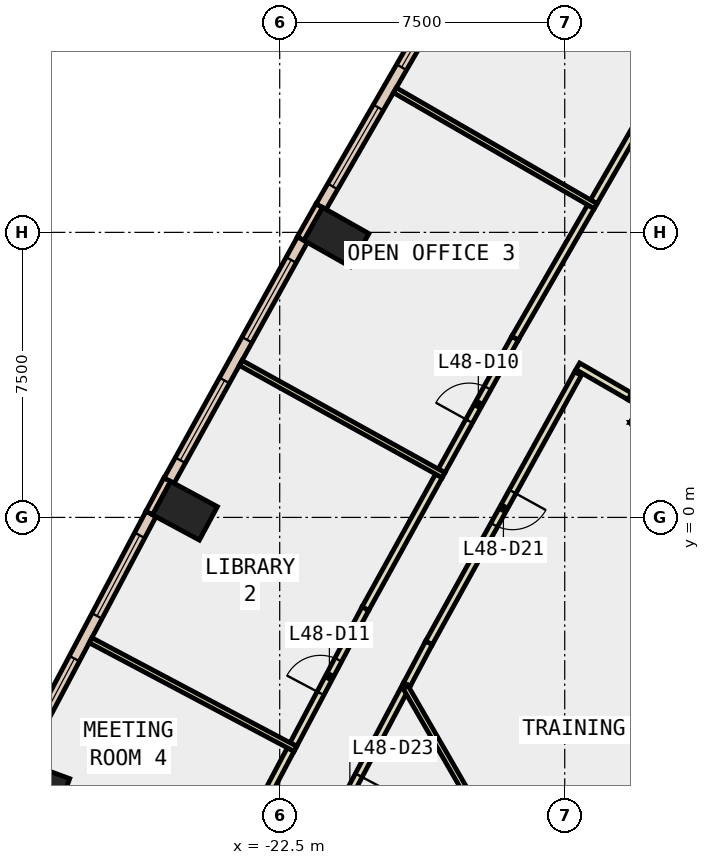
"""IFC4 building model, lengths in metres.
Left out: names, types, materials, properties, quantities, classifications, styles, units other than length and angle.
Written with IfcOpenShell. Run it as: python <this file> out.ifc"""

import sys

from ifc_helpers import new_model, si_unit, direction, frame, frame_2d, origin, origin_2d, place, context, subcontext, project, spatial, polyline, rectangle, outline, extrude, element, fill, save


model = new_model("IFC4")
c1 = context("Model", 3, precision=1e-05, world=origin(), true_north=direction((0.0, 1.0)))
c2 = subcontext(c1, "Body", "Model", "MODEL_VIEW")
j1 = project(units=[si_unit("LENGTHUNIT", "METRE"), si_unit("PLANEANGLEUNIT", "RADIAN")], contexts=[c1])
p1 = place(None, origin())
s1 = spatial("IfcSite", under=j1, at=p1, CompositionType="ELEMENT")
p2 = place(p1, origin())
s2 = spatial("IfcBuilding", under=s1, at=p2, CompositionType="ELEMENT")
p3 = place(p2, frame((0.0, 0.0, 215.0)))
s3 = spatial("IfcBuildingStorey", under=s2, at=p3, CompositionType="ELEMENT", Elevation=215.0)
for number, where, z_axis, x_axis in (
    (1, (-21.007, 7.377, -0.4), (0.0, 0.0, 1.0), (0.491, 0.871, 0.0)),
    (2, (-24.993, 0.175, -0.4), (0.0, 0.0, 1.0), (0.474, 0.88, 0.0)),
    (3, (-28.856, -7.1, -0.4), (0.0, 0.0, 1.0), (0.347, 0.938, 0.0)),
):
    element("IfcColumn", number, at=place(p3, frame(where, z_axis=z_axis, x_axis=x_axis)), inside=s3, PredefinedType="COLUMN", context=c2, shape_type="SweptSolid", body=[
        extrude(rectangle(XDim=1.0, YDim=1.4, at=origin_2d()), origin(), (0.0, 0.0, 1.0), 4.2),
    ])
p4 = place(p3, frame((0.0, 0.0, -0.4)))
e4 = element("IfcWall", 4, at=p4, inside=s3, PredefinedType="SHEAR", context=c2, shape_type="SweptSolid", body=[
    extrude(outline(polyline([(-12.228, 2.92), (-12.834, 3.27), (-13.279, 2.5), (-12.471, 2.5), (-12.228, 2.92)])), origin(), (0.0, 0.0, 1.0), 4.2),
])
p5 = place(p3, frame((0.0, 0.0, -0.4)))
e5 = element("IfcWall", 5, at=p5, inside=s3, PredefinedType="SHEAR", context=c2, shape_type="SweptSolid", body=[
    extrude(outline(polyline([(-13.279, 2.5), (-6.64, -9.0), (-6.235, -8.3), (-12.471, 2.5), (-13.279, 2.5)])), origin(), (0.0, 0.0, 1.0), 4.2),
])
p6 = place(p3, frame((-8.877, -5.125, -0.4), z_axis=(0.0, 0.0, 1.0), x_axis=(-0.866017533419, -0.500013631625, 0.0)))
e6 = element("IfcWall", 6, at=p6, inside=s3, PredefinedType="SHEAR", context=c2, shape_type="SweptSolid", body=[
    extrude(rectangle(XDim=9.0, YDim=0.8, at=frame_2d((4.5, 0.0))), origin(), (0.0, 0.0, 1.0), 4.2),
])
for number, where, z_axis, x_axis in (
    (7, (-21.458, 8.205, 0.0), (0.0, 0.0, 1.0), (-0.492, -0.871, 0.0)),
    (8, (-25.46, 0.995, 0.0), (0.0, 0.0, 1.0), (-0.474, -0.881, 0.0)),
):
    element("IfcWall", number, at=place(p3, frame(where, z_axis=z_axis, x_axis=x_axis)), inside=s3, PredefinedType="STANDARD", context=c2, shape_type="SweptSolid", body=[
        extrude(rectangle(XDim=1.0, YDim=0.2, at=frame_2d((0.5, 0.0))), origin(), (0.0, 0.0, 1.0), 3.8),
    ])
p7 = place(p3, frame((-17.787, 14.454, 0.0), z_axis=(0.0, 0.0, 1.0), x_axis=(-0.499968351115, -0.866043675505, 0.0)))
e9 = element("IfcWall", 9, at=p7, inside=s3, PredefinedType="STANDARD", context=c2, shape_type="SweptSolid", body=[
    extrude(rectangle(XDim=7.248, YDim=0.3, at=frame_2d((3.624, 0.0))), origin(), (0.0, 0.0, 1.0), 3.8),
])
p8 = place(p7, frame((0.612, 0.0, 0.9)))
e10 = element("IfcOpeningElement", 10, at=p8, cuts=e9, PredefinedType="OPENING", context=c2, shape_type="SweptSolid", body=[
    extrude(rectangle(XDim=2.4, YDim=2.6, at=frame_2d((1.2, 1.3))), frame((0.0, 0.16, 0.0), z_axis=(0.0, -1.0, 0.0), x_axis=(1.0, 0.0, 0.0)), (0.0, 0.0, 1.0), 0.32),
])
p9 = place(p7, frame((4.236, 0.0, 0.9)))
e11 = element("IfcOpeningElement", 11, at=p9, cuts=e9, PredefinedType="OPENING", context=c2, shape_type="SweptSolid", body=[
    extrude(rectangle(XDim=2.4, YDim=2.6, at=frame_2d((1.2, 1.3))), frame((0.0, 0.16, 0.0), z_axis=(0.0, -1.0, 0.0), x_axis=(1.0, 0.0, 0.0)), (0.0, 0.0, 1.0), 0.32),
])
p10 = place(p3, frame((-21.902, 7.309, 0.0), z_axis=(0.0, 0.0, 1.0), x_axis=(-0.484163461668, -0.87497756679, 0.0)))
e12 = element("IfcWall", 12, at=p10, inside=s3, PredefinedType="STANDARD", context=c2, shape_type="SweptSolid", body=[
    extrude(rectangle(XDim=7.247, YDim=0.3, at=frame_2d((3.624, 0.0))), origin(), (0.0, 0.0, 1.0), 3.8),
])
p11 = place(p10, frame((0.612, 0.0, 0.9)))
e13 = element("IfcOpeningElement", 13, at=p11, cuts=e12, PredefinedType="OPENING", context=c2, shape_type="SweptSolid", body=[
    extrude(rectangle(XDim=2.4, YDim=2.6, at=frame_2d((1.2, 1.3))), frame((0.0, 0.16, 0.0), z_axis=(0.0, -1.0, 0.0), x_axis=(1.0, 0.0, 0.0)), (0.0, 0.0, 1.0), 0.32),
])
p12 = place(p10, frame((4.235, 0.0, 0.9)))
e14 = element("IfcOpeningElement", 14, at=p12, cuts=e12, PredefinedType="OPENING", context=c2, shape_type="SweptSolid", body=[
    extrude(rectangle(XDim=2.4, YDim=2.6, at=frame_2d((1.2, 1.3))), frame((0.0, 0.16, 0.0), z_axis=(0.0, -1.0, 0.0), x_axis=(1.0, 0.0, 0.0)), (0.0, 0.0, 1.0), 0.32),
])
p13 = place(p3, frame((-25.887, 0.09, 0.0), z_axis=(0.0, 0.0, 1.0), x_axis=(-0.468020680141, -0.8837175131, 0.0)))
e15 = element("IfcWall", 15, at=p13, inside=s3, PredefinedType="STANDARD", context=c2, shape_type="SweptSolid", body=[
    extrude(rectangle(XDim=7.34, YDim=0.3, at=frame_2d((3.67, 0.0))), origin(), (0.0, 0.0, 1.0), 3.8),
])
p14 = place(p13, frame((0.635, 0.0, 0.9)))
e16 = element("IfcOpeningElement", 16, at=p14, cuts=e15, PredefinedType="OPENING", context=c2, shape_type="SweptSolid", body=[
    extrude(rectangle(XDim=2.4, YDim=2.6, at=frame_2d((1.2, 1.3))), frame((0.0, 0.16, 0.0), z_axis=(0.0, -1.0, 0.0), x_axis=(1.0, 0.0, 0.0)), (0.0, 0.0, 1.0), 0.32),
])
p15 = place(p13, frame((4.305, 0.0, 0.9)))
e17 = element("IfcOpeningElement", 17, at=p15, cuts=e15, PredefinedType="OPENING", context=c2, shape_type="SweptSolid", body=[
    extrude(rectangle(XDim=2.4, YDim=2.6, at=frame_2d((1.2, 1.3))), frame((0.0, 0.16, 0.0), z_axis=(0.0, -1.0, 0.0), x_axis=(1.0, 0.0, 0.0)), (0.0, 0.0, 1.0), 0.32),
])
p16 = place(p3, frame((-12.984, 3.01, 0.0), z_axis=(0.0, 0.0, 1.0), x_axis=(-0.866046247233, 0.49996389635, 0.0)))
e18 = element("IfcWall", 18, at=p16, inside=s3, PredefinedType="PARTITIONING", context=c2, shape_type="SweptSolid", body=[
    extrude(rectangle(XDim=0.35, YDim=0.2, at=frame_2d((0.175, 0.0))), origin(), (0.0, 0.0, 1.0), 2.4),
])
p17 = place(p3, frame((-14.652, 3.783, 0.0), z_axis=(0.0, 0.0, 1.0), x_axis=(-0.484249955458, -0.874929700398, 0.0)))
e19 = element("IfcWall", 19, at=p17, inside=s3, PredefinedType="PARTITIONING", context=c2, shape_type="SweptSolid", body=[
    extrude(rectangle(XDim=8.099, YDim=0.2, at=frame_2d((4.049, 0.0))), origin(), (0.0, 0.0, 1.0), 3.8),
])
p18 = place(p17, frame((3.55, 0.0, 0.0)))
e20 = element("IfcOpeningElement", 20, at=p18, cuts=e19, PredefinedType="OPENING", context=c2, shape_type="SweptSolid", body=[
    extrude(rectangle(XDim=1.0, YDim=2.1, at=frame_2d((0.5, 1.05))), frame((0.0, 0.11, 0.0), z_axis=(0.0, -1.0, 0.0), x_axis=(1.0, 0.0, 0.0)), (0.0, 0.0, 1.0), 0.22),
])
p19 = place(p3, frame((-18.574, -3.303, 0.0), z_axis=(0.0, 0.0, 1.0), x_axis=(-0.468458328651, -0.883485593724, 0.0)))
e21 = element("IfcWall", 21, at=p19, inside=s3, PredefinedType="PARTITIONING", context=c2, shape_type="SweptSolid", body=[
    extrude(rectangle(XDim=1.238, YDim=0.2, at=frame_2d((0.619, 0.0))), origin(), (0.0, 0.0, 1.0), 3.8),
])
p20 = place(p3, frame((-19.154, -4.397, 0.0), z_axis=(0.0, 0.0, 1.0), x_axis=(-0.468118749105, -0.883665568378, 0.0)))
e22 = element("IfcWall", 22, at=p20, inside=s3, PredefinedType="PARTITIONING", context=c2, shape_type="SweptSolid", body=[
    extrude(rectangle(XDim=6.409, YDim=0.2, at=frame_2d((3.204, 0.0))), origin(), (0.0, 0.0, 1.0), 3.8),
])
p21 = place(p20, frame((2.704, 0.0, 0.0)))
e23 = element("IfcOpeningElement", 23, at=p21, cuts=e22, PredefinedType="OPENING", context=c2, shape_type="SweptSolid", body=[
    extrude(rectangle(XDim=1.0, YDim=2.1, at=frame_2d((0.5, 1.05))), frame((0.0, 0.11, 0.0), z_axis=(0.0, -1.0, 0.0), x_axis=(1.0, 0.0, 0.0)), (0.0, 0.0, 1.0), 0.22),
])
p22 = place(p3, frame((-14.236, 8.305, 0.0), z_axis=(0.0, 0.0, 1.0), x_axis=(0.500110539333, 0.865961574464, 0.0)))
e24 = element("IfcWall", 24, at=p22, inside=s3, PredefinedType="PARTITIONING", context=c2, shape_type="SweptSolid", body=[
    extrude(rectangle(XDim=3.993, YDim=0.2, at=frame_2d((1.997, 0.0))), origin(), (0.0, 0.0, 1.0), 3.8),
])
p23 = place(p3, frame((-18.24, 1.225, 0.0), z_axis=(0.0, 0.0, 1.0), x_axis=(0.484411997038, 0.874839995156, 0.0)))
e25 = element("IfcWall", 25, at=p23, inside=s3, PredefinedType="PARTITIONING", context=c2, shape_type="SweptSolid", body=[
    extrude(rectangle(XDim=3.993, YDim=0.2, at=frame_2d((1.996, 0.0))), origin(), (0.0, 0.0, 1.0), 3.8),
])
p24 = place(p23, frame((1.496, 0.0, 0.0)))
e26 = element("IfcOpeningElement", 26, at=p24, cuts=e25, PredefinedType="OPENING", context=c2, shape_type="SweptSolid", body=[
    extrude(rectangle(XDim=1.0, YDim=2.1, at=frame_2d((0.5, 1.05))), frame((0.0, 0.11, 0.0), z_axis=(0.0, -1.0, 0.0), x_axis=(1.0, 0.0, 0.0)), (0.0, 0.0, 1.0), 0.22),
])
p25 = place(p3, frame((-16.306, 4.718, 0.0), z_axis=(0.0, 0.0, 1.0), x_axis=(0.499803646539, 0.866138738832, 0.0)))
e27 = element("IfcWall", 27, at=p25, inside=s3, PredefinedType="PARTITIONING", context=c2, shape_type="SweptSolid", body=[
    extrude(rectangle(XDim=3.991, YDim=0.2, at=frame_2d((1.996, 0.0))), origin(), (0.0, 0.0, 1.0), 3.8),
])
p26 = place(p3, frame((-22.14, -5.976, 0.0), z_axis=(0.0, 0.0, 1.0), x_axis=(0.467979143965, 0.883739509592, 0.0)))
e28 = element("IfcWall", 28, at=p26, inside=s3, PredefinedType="PARTITIONING", context=c2, shape_type="SweptSolid", body=[
    extrude(rectangle(XDim=4.049, YDim=0.2, at=frame_2d((2.024, 0.0))), origin(), (0.0, 0.0, 1.0), 3.8),
])
p27 = place(p26, frame((1.524, 0.0, 0.0)))
e29 = element("IfcOpeningElement", 29, at=p27, cuts=e28, PredefinedType="OPENING", context=c2, shape_type="SweptSolid", body=[
    extrude(rectangle(XDim=1.0, YDim=2.1, at=frame_2d((0.5, 1.05))), frame((0.0, 0.11, 0.0), z_axis=(0.0, -1.0, 0.0), x_axis=(1.0, 0.0, 0.0)), (0.0, 0.0, 1.0), 0.22),
])
p28 = place(p3, frame((-20.245, -2.398, 0.0), z_axis=(0.0, 0.0, 1.0), x_axis=(0.484328424129, 0.874886265511, 0.0)))
e30 = element("IfcWall", 30, at=p28, inside=s3, PredefinedType="PARTITIONING", context=c2, shape_type="SweptSolid", body=[
    extrude(rectangle(XDim=3.991, YDim=0.2, at=frame_2d((1.996, 0.0))), origin(), (0.0, 0.0, 1.0), 3.8),
])
p29 = place(p3, frame((-23.878, -9.256, 0.0), z_axis=(0.0, 0.0, 1.0), x_axis=(0.46795384568, 0.883752905689, 0.0)))
e31 = element("IfcWall", 31, at=p29, inside=s3, PredefinedType="PARTITIONING", context=c2, shape_type="SweptSolid", body=[
    extrude(rectangle(XDim=3.562, YDim=0.2, at=frame_2d((1.781, 0.0))), origin(), (0.0, 0.0, 1.0), 3.8),
])
p30 = place(p29, frame((1.281, 0.0, 0.0)))
e32 = element("IfcOpeningElement", 32, at=p30, cuts=e31, PredefinedType="OPENING", context=c2, shape_type="SweptSolid", body=[
    extrude(rectangle(XDim=1.0, YDim=2.1, at=frame_2d((0.5, 1.05))), frame((0.0, 0.11, 0.0), z_axis=(0.0, -1.0, 0.0), x_axis=(1.0, 0.0, 0.0)), (0.0, 0.0, 1.0), 0.22),
])
p31 = place(p3, frame((-16.525, -9.079, 0.0), z_axis=(0.0, 0.0, 1.0), x_axis=(-0.499943228252, 0.866058178487, 0.0)))
e33 = element("IfcWall", 33, at=p31, inside=s3, PredefinedType="PARTITIONING", context=c2, shape_type="SweptSolid", body=[
    extrude(rectangle(XDim=5.329, YDim=0.15, at=frame_2d((2.664, 0.0))), origin(), (0.0, 0.0, 1.0), 3.8),
])
p32 = place(p3, frame((-14.187, 8.19, 0.0), z_axis=(0.0, 0.0, 1.0), x_axis=(-0.865990270311, 0.500060848024, 0.0)))
e34 = element("IfcWall", 34, at=p32, inside=s3, PredefinedType="PARTITIONING", context=c2, shape_type="SweptSolid", body=[
    extrude(rectangle(XDim=6.099, YDim=0.15, at=frame_2d((3.05, 0.0))), origin(), (0.0, 0.0, 1.0), 3.8),
])
p33 = place(p3, frame((-18.189, 1.111, 0.0), z_axis=(0.0, 0.0, 1.0), x_axis=(-0.874928335558, 0.484252421405, 0.0)))
e35 = element("IfcWall", 35, at=p33, inside=s3, PredefinedType="PARTITIONING", context=c2, shape_type="SweptSolid", body=[
    extrude(rectangle(XDim=6.1, YDim=0.15, at=frame_2d((3.05, 0.0))), origin(), (0.0, 0.0, 1.0), 3.8),
])
p34 = place(p3, frame((-22.087, -6.089, 0.0), z_axis=(0.0, 0.0, 1.0), x_axis=(-0.883611647524, 0.468220521079, 0.0)))
e36 = element("IfcWall", 36, at=p34, inside=s3, PredefinedType="PARTITIONING", context=c2, shape_type="SweptSolid", body=[
    extrude(rectangle(XDim=6.1, YDim=0.15, at=frame_2d((3.05, 0.0))), origin(), (0.0, 0.0, 1.0), 3.8),
])
p35 = place(p3, frame((-13.287, 3.185, 0.0), z_axis=(0.0, 0.0, 1.0), x_axis=(-0.865992812752, 0.500056445075, 0.0)))
e37 = element("IfcWall", 37, at=p35, inside=s3, PredefinedType="PARTITIONING", context=c2, shape_type="SweptSolid", body=[
    extrude(rectangle(XDim=1.582, YDim=0.2, at=frame_2d((0.791, 0.0))), origin(), (0.0, 0.0, 1.0), 3.8),
])
p36 = place(p8, origin())
e38 = element("IfcWindow", 38, at=p36, inside=s3, PartitioningType="SINGLE_PANEL", PredefinedType="WINDOW", context=c2, shape_type="SweptSolid", body=[
    extrude(rectangle(XDim=2.4, YDim=2.6, at=frame_2d((1.2, 1.3))), frame((0.0, 0.03, 0.0), z_axis=(0.0, -1.0, 0.0), x_axis=(1.0, 0.0, 0.0)), (0.0, 0.0, 1.0), 0.06),
])
fill(e10, e38)
p37 = place(p9, origin())
e39 = element("IfcWindow", 39, at=p37, inside=s3, PartitioningType="SINGLE_PANEL", PredefinedType="WINDOW", context=c2, shape_type="SweptSolid", body=[
    extrude(rectangle(XDim=2.4, YDim=2.6, at=frame_2d((1.2, 1.3))), frame((0.0, 0.03, 0.0), z_axis=(0.0, -1.0, 0.0), x_axis=(1.0, 0.0, 0.0)), (0.0, 0.0, 1.0), 0.06),
])
fill(e11, e39)
p38 = place(p11, origin())
e40 = element("IfcWindow", 40, at=p38, inside=s3, PartitioningType="SINGLE_PANEL", PredefinedType="WINDOW", context=c2, shape_type="SweptSolid", body=[
    extrude(rectangle(XDim=2.4, YDim=2.6, at=frame_2d((1.2, 1.3))), frame((0.0, 0.03, 0.0), z_axis=(0.0, -1.0, 0.0), x_axis=(1.0, 0.0, 0.0)), (0.0, 0.0, 1.0), 0.06),
])
fill(e13, e40)
p39 = place(p12, origin())
e41 = element("IfcWindow", 41, at=p39, inside=s3, PartitioningType="SINGLE_PANEL", PredefinedType="WINDOW", context=c2, shape_type="SweptSolid", body=[
    extrude(rectangle(XDim=2.4, YDim=2.6, at=frame_2d((1.2, 1.3))), frame((0.0, 0.03, 0.0), z_axis=(0.0, -1.0, 0.0), x_axis=(1.0, 0.0, 0.0)), (0.0, 0.0, 1.0), 0.06),
])
fill(e14, e41)
p40 = place(p14, origin())
e42 = element("IfcWindow", 42, at=p40, inside=s3, PartitioningType="SINGLE_PANEL", PredefinedType="WINDOW", context=c2, shape_type="SweptSolid", body=[
    extrude(rectangle(XDim=2.4, YDim=2.6, at=frame_2d((1.2, 1.3))), frame((0.0, 0.03, 0.0), z_axis=(0.0, -1.0, 0.0), x_axis=(1.0, 0.0, 0.0)), (0.0, 0.0, 1.0), 0.06),
])
fill(e16, e42)
p41 = place(p15, origin())
e43 = element("IfcWindow", 43, at=p41, inside=s3, PartitioningType="SINGLE_PANEL", PredefinedType="WINDOW", context=c2, shape_type="SweptSolid", body=[
    extrude(rectangle(XDim=2.4, YDim=2.6, at=frame_2d((1.2, 1.3))), frame((0.0, 0.03, 0.0), z_axis=(0.0, -1.0, 0.0), x_axis=(1.0, 0.0, 0.0)), (0.0, 0.0, 1.0), 0.06),
])
fill(e17, e43)
p42 = place(p24, origin())
e44 = element("IfcDoor", 44, at=p42, inside=s3, OperationType="SINGLE_SWING_LEFT", PredefinedType="DOOR", context=c2, shape_type="SweptSolid", body=[
    extrude(rectangle(XDim=1.0, YDim=2.1, at=frame_2d((0.5, 1.05))), frame((0.0, 0.025, 0.0), z_axis=(0.0, -1.0, 0.0), x_axis=(1.0, 0.0, 0.0)), (0.0, 0.0, 1.0), 0.05),
])
fill(e26, e44)
p43 = place(p27, origin())
e45 = element("IfcDoor", 45, at=p43, inside=s3, OperationType="SINGLE_SWING_LEFT", PredefinedType="DOOR", context=c2, shape_type="SweptSolid", body=[
    extrude(rectangle(XDim=1.0, YDim=2.1, at=frame_2d((0.5, 1.05))), frame((0.0, 0.025, 0.0), z_axis=(0.0, -1.0, 0.0), x_axis=(1.0, 0.0, 0.0)), (0.0, 0.0, 1.0), 0.05),
])
fill(e29, e45)
p44 = place(p18, origin())
e46 = element("IfcDoor", 46, at=p44, inside=s3, OperationType="SINGLE_SWING_LEFT", PredefinedType="DOOR", context=c2, shape_type="SweptSolid", body=[
    extrude(rectangle(XDim=1.0, YDim=2.1, at=frame_2d((0.5, 1.05))), frame((0.0, 0.025, 0.0), z_axis=(0.0, -1.0, 0.0), x_axis=(1.0, 0.0, 0.0)), (0.0, 0.0, 1.0), 0.05),
])
fill(e20, e46)
p45 = place(p21, origin())
e47 = element("IfcDoor", 47, at=p45, inside=s3, OperationType="SINGLE_SWING_LEFT", PredefinedType="DOOR", context=c2, shape_type="SweptSolid", body=[
    extrude(rectangle(XDim=1.0, YDim=2.1, at=frame_2d((0.5, 1.05))), frame((0.0, 0.025, 0.0), z_axis=(0.0, -1.0, 0.0), x_axis=(1.0, 0.0, 0.0)), (0.0, 0.0, 1.0), 0.05),
])
fill(e23, e47)
save(model, sys.argv[1])
